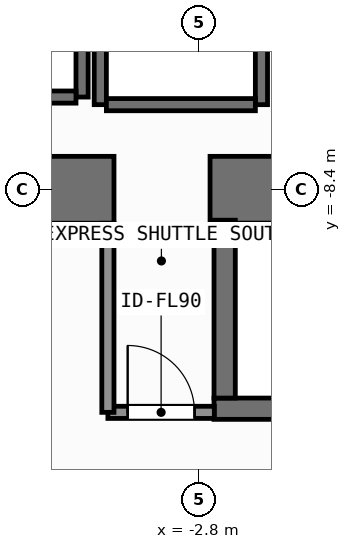
"""IFC4 building model, lengths in metres.
Left out: names, types, materials, properties, quantities, classifications, styles, units other than length and angle.
Written with IfcOpenShell. Run it as: python <this file> out.ifc"""

import sys

from ifc_helpers import new_model, si_unit, direction, frame, frame_2d, origin, place, context, subcontext, project, spatial, rectangle, extrude, element, fill, save


model = new_model("IFC4")
c1 = context("Model", 3, precision=1e-05, world=origin(), true_north=direction((0.0, 1.0)))
c2 = subcontext(c1, "Body", "Model", "MODEL_VIEW")
j1 = project(units=[si_unit("LENGTHUNIT", "METRE"), si_unit("PLANEANGLEUNIT", "RADIAN")], contexts=[c1])
p1 = place(None, origin())
s1 = spatial("IfcSite", under=j1, at=p1, CompositionType="ELEMENT")
p2 = place(p1, origin())
s2 = spatial("IfcBuilding", under=s1, at=p2, CompositionType="ELEMENT")
p3 = place(p2, frame((0.0, 0.0, 17.4)))
s3 = spatial("IfcBuildingStorey", under=s2, at=p3, CompositionType="ELEMENT", Elevation=17.4)
p4 = place(p3, frame((-7.55, -8.4, 0.0), z_axis=(0.0, 0.0, 1.0), x_axis=(1.0, 0.0, 0.0)))
e1 = element("IfcWall", 1, at=p4, inside=s3, PredefinedType="SHEAR", context=c2, shape_type="SweptSolid", body=[
    extrude(rectangle(XDim=3.35, YDim=1.1, at=frame_2d((1.675, 0.0))), origin(), (0.0, 0.0, 1.0), 4.2),
])
p5 = place(p3, frame((-2.62, -8.4, 0.0), z_axis=(0.0, 0.0, 1.0), x_axis=(1.0, 0.0, 0.0)))
e2 = element("IfcWall", 2, at=p5, inside=s3, PredefinedType="SHEAR", context=c2, shape_type="SweptSolid", body=[
    extrude(rectangle(XDim=7.27, YDim=1.1, at=frame_2d((3.635, 0.0))), origin(), (0.0, 0.0, 1.0), 4.2),
])
p6 = place(p3, frame((-2.555, -12.0, 0.0), z_axis=(0.0, 0.0, 1.0), x_axis=(1.0, 0.0, 0.0)))
e3 = element("IfcWall", 3, at=p6, inside=s3, PredefinedType="SHEAR", context=c2, shape_type="SweptSolid", body=[
    extrude(rectangle(XDim=7.31, YDim=0.35, at=frame_2d((3.655, 0.0))), origin(), (0.0, 0.0, 1.0), 4.2),
])
p7 = place(p3, frame((-2.2, -8.988, 0.0), z_axis=(0.0, 0.0, 1.0), x_axis=(1.0, 0.0, 0.0)))
e4 = element("IfcWall", 4, at=p7, inside=s3, PredefinedType="SHEAR", context=c2, shape_type="SweptSolid", body=[
    extrude(rectangle(XDim=6.6, YDim=0.075, at=frame_2d((3.3, 0.0))), origin(), (0.0, 0.0, 1.0), 4.2),
])
p8 = place(p3, frame((-2.38, -11.825, 0.0), z_axis=(0.0, 0.0, 1.0), x_axis=(0.0, 1.0, 0.0)))
e5 = element("IfcWall", 5, at=p8, inside=s3, PredefinedType="SHEAR", context=c2, shape_type="SweptSolid", body=[
    extrude(rectangle(XDim=2.925, YDim=0.35, at=frame_2d((1.462, 0.0))), origin(), (0.0, 0.0, 1.0), 4.2),
])
p9 = place(p3, frame((-4.725, -6.875, 0.0), z_axis=(0.0, 0.0, 1.0), x_axis=(0.0, 1.0, 0.0)))
e6 = element("IfcWall", 6, at=p9, inside=s3, PredefinedType="SHEAR", context=c2, shape_type="SweptSolid", body=[
    extrude(rectangle(XDim=2.55, YDim=0.2, at=frame_2d((1.275, 0.0))), origin(), (0.0, 0.0, 1.0), 3.96),
])
p10 = place(p3, frame((-7.175, -6.875, 0.0), z_axis=(0.0, 0.0, 1.0), x_axis=(1.0, 0.0, 0.0)))
e7 = element("IfcWall", 7, at=p10, inside=s3, PredefinedType="SHEAR", context=c2, shape_type="SweptSolid", body=[
    extrude(rectangle(XDim=2.35, YDim=0.2, at=frame_2d((1.175, 0.0))), origin(), (0.0, 0.0, 1.0), 3.96),
])
for number, where, z_axis, x_axis in (
    (8, (-4.425, -7.0, 0.0), (0.0, 0.0, 1.0), (0.0, 1.0, 0.0)),
    (9, (-1.775, -7.0, 0.0), (0.0, 0.0, 1.0), (0.0, 1.0, 0.0)),
):
    element("IfcWall", number, at=place(p3, frame(where, z_axis=z_axis, x_axis=x_axis)), inside=s3, PredefinedType="SHEAR", context=c2, shape_type="SweptSolid", body=[
        extrude(rectangle(XDim=2.8, YDim=0.2, at=frame_2d((1.4, 0.0))), origin(), (0.0, 0.0, 1.0), 3.96),
    ])
p11 = place(p3, frame((-4.325, -7.0, 0.0), z_axis=(0.0, 0.0, 1.0), x_axis=(1.0, 0.0, 0.0)))
e10 = element("IfcWall", 10, at=p11, inside=s3, PredefinedType="SHEAR", context=c2, shape_type="SweptSolid", body=[
    extrude(rectangle(XDim=2.45, YDim=0.2, at=frame_2d((1.225, 0.0))), origin(), (0.0, 0.0, 1.0), 3.96),
])
p12 = place(p3, frame((-4.3, -12.06, 0.0), z_axis=(0.0, 0.0, 1.0), x_axis=(1.0, 0.0, 0.0)))
e11 = element("IfcWall", 11, at=p12, inside=s3, PredefinedType="SOLIDWALL", context=c2, shape_type="SweptSolid", body=[
    extrude(rectangle(XDim=1.75, YDim=0.2, at=frame_2d((0.875, 0.0))), origin(), (0.0, 0.0, 1.0), 3.96),
])
p13 = place(p12, frame((0.325, 0.0, 0.0)))
e12 = element("IfcOpeningElement", 12, at=p13, cuts=e11, PredefinedType="OPENING", context=c2, shape_type="SweptSolid", body=[
    extrude(rectangle(XDim=1.1, YDim=2.15, at=frame_2d((0.55, 1.075))), frame((0.0, 0.11, 0.0), z_axis=(0.0, -1.0, 0.0), x_axis=(1.0, 0.0, 0.0)), (0.0, 0.0, 1.0), 0.22),
])
p14 = place(p3, frame((-4.3, -12.06, 0.0), z_axis=(0.0, 0.0, 1.0), x_axis=(0.0, 1.0, 0.0)))
e13 = element("IfcWall", 13, at=p14, inside=s3, PredefinedType="SOLIDWALL", context=c2, shape_type="SweptSolid", body=[
    extrude(rectangle(XDim=3.11, YDim=0.2, at=frame_2d((1.555, 0.0))), origin(), (0.0, 0.0, 1.0), 3.96),
])
p15 = place(p13, origin())
e14 = element("IfcDoor", 14, at=p15, inside=s3, OperationType="SINGLE_SWING_LEFT", PredefinedType="DOOR", context=c2, shape_type="SweptSolid", body=[
    extrude(rectangle(XDim=1.1, YDim=2.15, at=frame_2d((0.55, 1.075))), frame((0.0, 0.025, 0.0), z_axis=(0.0, -1.0, 0.0), x_axis=(1.0, 0.0, 0.0)), (0.0, 0.0, 1.0), 0.05),
])
fill(e12, e14)
save(model, sys.argv[1])
